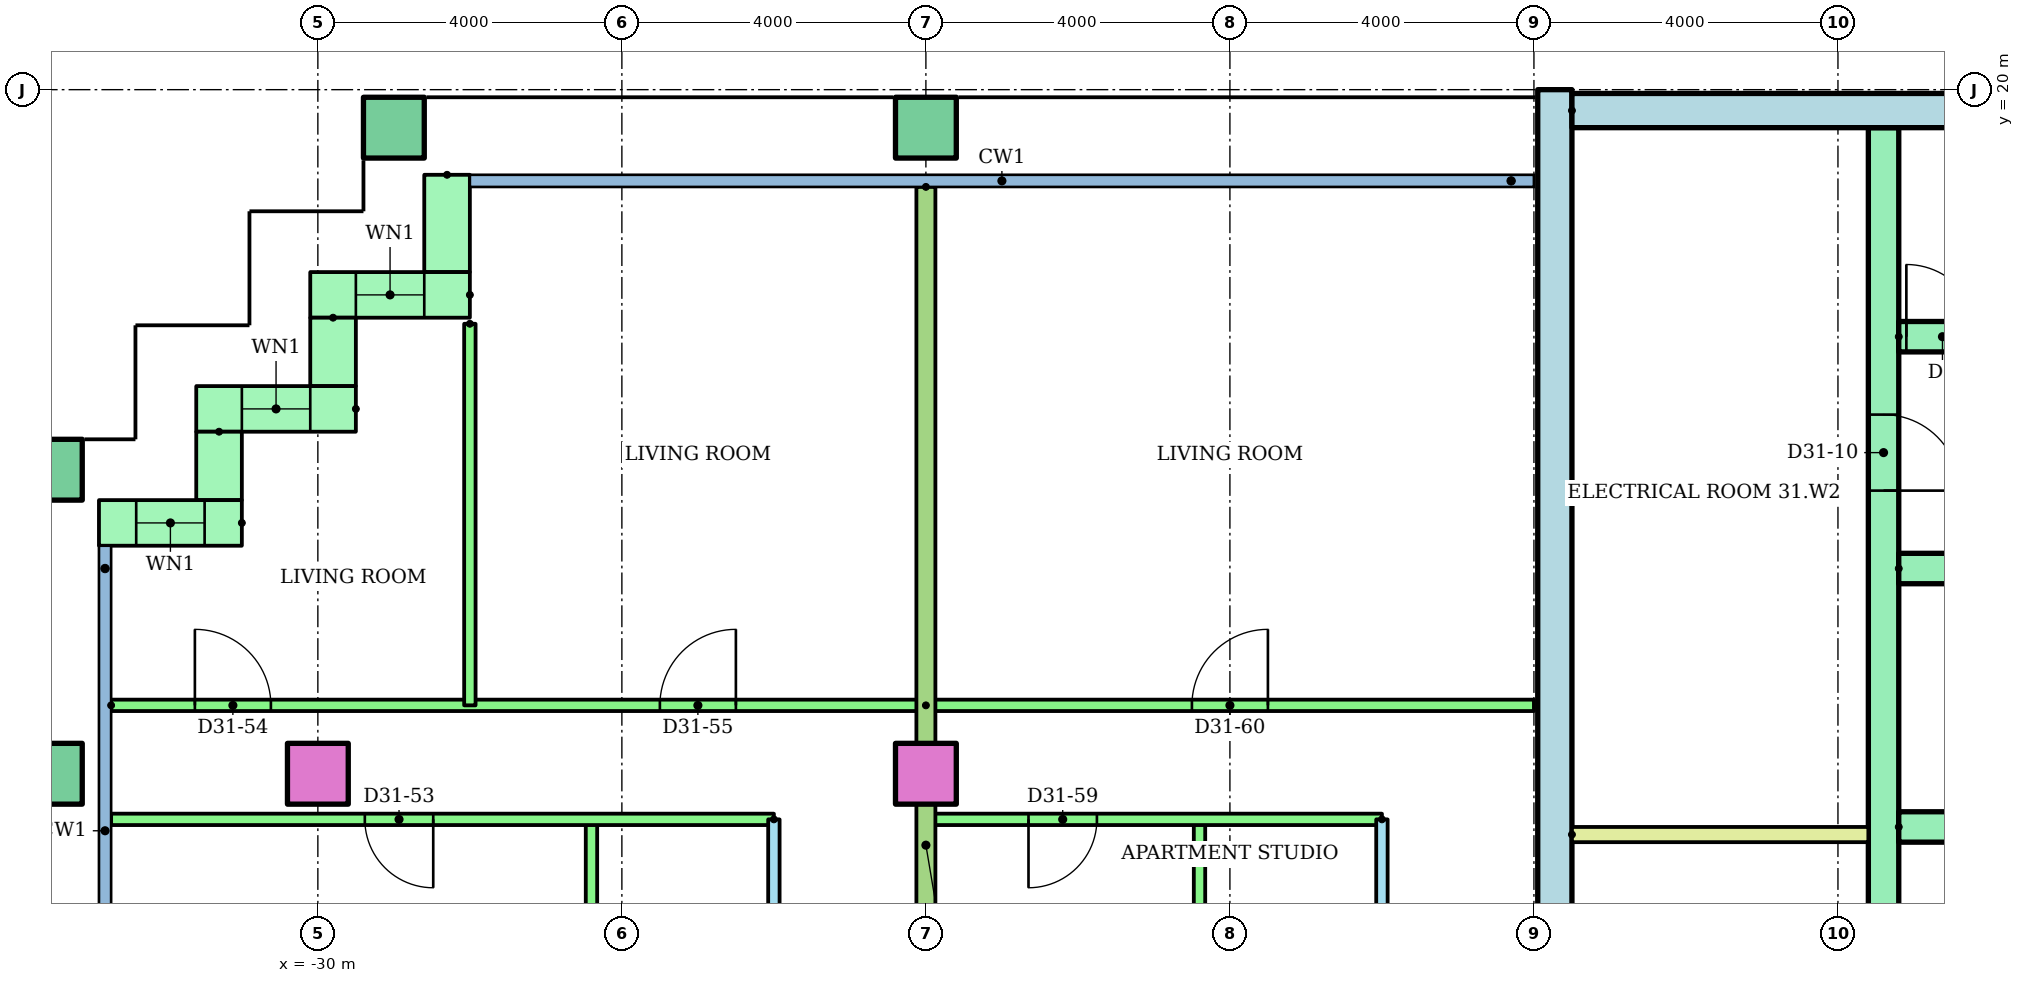
"""IFC4 building model, lengths in metres.
Left out: names, types, materials, properties, quantities, classifications, styles, units other than length and angle.
Written with IfcOpenShell. Run it as: python <this file> out.ifc"""

import sys

from ifc_helpers import new_model, si_unit, direction, frame, frame_2d, origin, origin_2d, place, context, subcontext, project, spatial, rectangle, hollow_rectangle, extrude, element, fill, save


model = new_model("IFC4")
c1 = context("Model", 3, precision=1e-05, world=origin(), true_north=direction((0.0, 1.0)))
c2 = subcontext(c1, "Body", "Model", "MODEL_VIEW")
j1 = project(units=[si_unit("LENGTHUNIT", "METRE"), si_unit("PLANEANGLEUNIT", "RADIAN")], contexts=[c1])
p1 = place(None, origin())
s1 = spatial("IfcSite", under=j1, at=p1, CompositionType="ELEMENT")
p2 = place(p1, origin())
s2 = spatial("IfcBuilding", under=s1, at=p2, CompositionType="ELEMENT")
p3 = place(p2, frame((0.0, 0.0, 123.0)))
s3 = spatial("IfcBuildingStorey", under=s2, at=p3, CompositionType="ELEMENT", Elevation=123.0)
p4 = place(p3, frame((-33.5, 11.0, 0.0)))
e1 = element("IfcColumn", 1, at=p4, inside=s3, PredefinedType="COLUMN", context=c2, shape_type="SweptSolid", body=[
    extrude(hollow_rectangle(XDim=0.8, YDim=0.8, WallThickness=0.04, at=origin_2d()), origin(), (0.0, 0.0, 1.0), 3.2),
])
for number, where in (
    (2, (-30.0, 11.0, 0.0)),
    (3, (-22.0, 11.0, 0.0)),
):
    element("IfcColumn", number, at=place(p3, frame(where)), inside=s3, PredefinedType="COLUMN", context=c2, shape_type="SweptSolid", body=[
        extrude(rectangle(XDim=0.8, YDim=0.8, at=origin_2d()), origin(), (0.0, 0.0, 1.0), 3.2),
    ])
for number, where in (
    (4, (-33.5, 15.0, 0.0)),
    (5, (-29.0, 19.5, 0.0)),
    (6, (-22.0, 19.5, 0.0)),
):
    element("IfcColumn", number, at=place(p3, frame(where)), inside=s3, PredefinedType="COLUMN", context=c2, shape_type="SweptSolid", body=[
        extrude(hollow_rectangle(XDim=0.8, YDim=0.8, WallThickness=0.04, at=origin_2d()), origin(), (0.0, 0.0, 1.0), 3.2),
    ])
p5 = place(p3, frame((-28.3, 18.88, 0.0), z_axis=(0.0, 0.0, 1.0), x_axis=(0.0, -1.0, 0.0)))
e7 = element("IfcWall", 7, at=p5, inside=s3, PredefinedType="STANDARD", context=c2, shape_type="SweptSolid", body=[
    extrude(rectangle(XDim=1.28, YDim=0.6, at=frame_2d((0.64, 0.0))), origin(), (0.0, 0.0, 1.0), 2.92),
])
p6 = place(p3, frame((-28.0, 17.3, 0.0), z_axis=(0.0, 0.0, 1.0), x_axis=(-1.0, 0.0, 0.0)))
e8 = element("IfcWall", 8, at=p6, inside=s3, PredefinedType="STANDARD", context=c2, shape_type="SweptSolid", body=[
    extrude(rectangle(XDim=2.1, YDim=0.6, at=frame_2d((1.05, 0.0))), origin(), (0.0, 0.0, 1.0), 2.92),
])
p7 = place(p6, frame((0.6, 0.0, 0.9)))
e9 = element("IfcOpeningElement", 9, at=p7, cuts=e8, PredefinedType="OPENING", context=c2, shape_type="SweptSolid", body=[
    extrude(rectangle(XDim=0.9, YDim=1.5, at=frame_2d((0.45, 0.75))), frame((0.0, 0.31, 0.0), z_axis=(0.0, -1.0, 0.0), x_axis=(1.0, 0.0, 0.0)), (0.0, 0.0, 1.0), 0.62),
])
p8 = place(p3, frame((-29.8, 17.0, 0.0), z_axis=(0.0, 0.0, 1.0), x_axis=(0.0, -1.0, 0.0)))
e10 = element("IfcWall", 10, at=p8, inside=s3, PredefinedType="STANDARD", context=c2, shape_type="SweptSolid", body=[
    extrude(rectangle(XDim=0.9, YDim=0.6, at=frame_2d((0.45, 0.0))), origin(), (0.0, 0.0, 1.0), 2.92),
])
p9 = place(p3, frame((-29.5, 15.8, 0.0), z_axis=(0.0, 0.0, 1.0), x_axis=(-1.0, 0.0, 0.0)))
e11 = element("IfcWall", 11, at=p9, inside=s3, PredefinedType="STANDARD", context=c2, shape_type="SweptSolid", body=[
    extrude(rectangle(XDim=2.1, YDim=0.6, at=frame_2d((1.05, 0.0))), origin(), (0.0, 0.0, 1.0), 2.92),
])
p10 = place(p9, frame((0.6, 0.0, 0.9)))
e12 = element("IfcOpeningElement", 12, at=p10, cuts=e11, PredefinedType="OPENING", context=c2, shape_type="SweptSolid", body=[
    extrude(rectangle(XDim=0.9, YDim=1.5, at=frame_2d((0.45, 0.75))), frame((0.0, 0.31, 0.0), z_axis=(0.0, -1.0, 0.0), x_axis=(1.0, 0.0, 0.0)), (0.0, 0.0, 1.0), 0.62),
])
p11 = place(p3, frame((-31.3, 15.5, 0.0), z_axis=(0.0, 0.0, 1.0), x_axis=(0.0, -1.0, 0.0)))
e13 = element("IfcWall", 13, at=p11, inside=s3, PredefinedType="STANDARD", context=c2, shape_type="SweptSolid", body=[
    extrude(rectangle(XDim=0.9, YDim=0.6, at=frame_2d((0.45, 0.0))), origin(), (0.0, 0.0, 1.0), 2.92),
])
p12 = place(p3, frame((-31.0, 14.3, 0.0), z_axis=(0.0, 0.0, 1.0), x_axis=(-1.0, 0.0, 0.0)))
e14 = element("IfcWall", 14, at=p12, inside=s3, PredefinedType="STANDARD", context=c2, shape_type="SweptSolid", body=[
    extrude(rectangle(XDim=1.88, YDim=0.6, at=frame_2d((0.94, 0.0))), origin(), (0.0, 0.0, 1.0), 2.92),
])
p13 = place(p12, frame((0.49, 0.0, 0.9)))
e15 = element("IfcOpeningElement", 15, at=p13, cuts=e14, PredefinedType="OPENING", context=c2, shape_type="SweptSolid", body=[
    extrude(rectangle(XDim=0.9, YDim=1.5, at=frame_2d((0.45, 0.75))), frame((0.0, 0.31, 0.0), z_axis=(0.0, -1.0, 0.0), x_axis=(1.0, 0.0, 0.0)), (0.0, 0.0, 1.0), 0.62),
])
p14 = place(p3, frame((-13.725, 3.0, 0.0), z_axis=(0.0, 0.0, 1.0), x_axis=(0.0, 1.0, 0.0)))
e16 = element("IfcWall", 16, at=p14, inside=s3, PredefinedType="SHEAR", context=c2, shape_type="SweptSolid", body=[
    extrude(rectangle(XDim=17.0, YDim=0.45, at=frame_2d((8.5, 0.0))), origin(), (0.0, 0.0, 1.0), 2.92),
])
p15 = place(p3, frame((-13.5, 19.725, 0.0)))
e17 = element("IfcWall", 17, at=p15, inside=s3, PredefinedType="SHEAR", context=c2, shape_type="SweptSolid", body=[
    extrude(rectangle(XDim=27.0, YDim=0.45, at=frame_2d((13.5, 0.0))), origin(), (0.0, 0.0, 1.0), 2.92),
])
p16 = place(p3, frame((-9.4, 6.8, 0.0), z_axis=(0.0, 0.0, 1.0), x_axis=(0.0, 1.0, 0.0)))
e18 = element("IfcWall", 18, at=p16, inside=s3, PredefinedType="SHEAR", context=c2, shape_type="SweptSolid", body=[
    extrude(rectangle(XDim=12.7, YDim=0.4, at=frame_2d((6.35, 0.0))), origin(), (0.0, 0.0, 1.0), 2.92),
])
p17 = place(p16, frame((1.15, 0.0, 0.0)))
e19 = element("IfcOpeningElement", 19, at=p17, cuts=e18, PredefinedType="OPENING", context=c2, shape_type="SweptSolid", body=[
    extrude(rectangle(XDim=1.0, YDim=2.1, at=frame_2d((0.5, 1.05))), frame((0.0, 0.21, 0.0), z_axis=(0.0, -1.0, 0.0), x_axis=(1.0, 0.0, 0.0)), (0.0, 0.0, 1.0), 0.42),
])
p18 = place(p16, frame((7.925, 0.0, 0.0)))
e20 = element("IfcOpeningElement", 20, at=p18, cuts=e18, PredefinedType="OPENING", context=c2, shape_type="SweptSolid", body=[
    extrude(rectangle(XDim=1.0, YDim=2.1, at=frame_2d((0.5, 1.05))), frame((0.0, 0.21, 0.0), z_axis=(0.0, -1.0, 0.0), x_axis=(1.0, 0.0, 0.0)), (0.0, 0.0, 1.0), 0.42),
])
p19 = place(p3, frame((-9.2, 10.3, 0.0)))
e21 = element("IfcWall", 21, at=p19, inside=s3, PredefinedType="SHEAR", context=c2, shape_type="SweptSolid", body=[
    extrude(rectangle(XDim=8.0, YDim=0.4, at=frame_2d((4.0, 0.0))), origin(), (0.0, 0.0, 1.0), 2.92),
])
p20 = place(p19, frame((2.033, 0.0, 0.0)))
e22 = element("IfcOpeningElement", 22, at=p20, cuts=e21, PredefinedType="OPENING", context=c2, shape_type="SweptSolid", body=[
    extrude(rectangle(XDim=1.0, YDim=2.1, at=frame_2d((0.5, 1.05))), frame((0.0, 0.21, 0.0), z_axis=(0.0, -1.0, 0.0), x_axis=(1.0, 0.0, 0.0)), (0.0, 0.0, 1.0), 0.42),
])
p21 = place(p19, frame((6.133, 0.0, 0.0)))
e23 = element("IfcOpeningElement", 23, at=p21, cuts=e21, PredefinedType="OPENING", context=c2, shape_type="SweptSolid", body=[
    extrude(rectangle(XDim=1.0, YDim=2.1, at=frame_2d((0.5, 1.05))), frame((0.0, 0.21, 0.0), z_axis=(0.0, -1.0, 0.0), x_axis=(1.0, 0.0, 0.0)), (0.0, 0.0, 1.0), 0.42),
])
p22 = place(p3, frame((-9.2, 13.7, 0.0)))
e24 = element("IfcWall", 24, at=p22, inside=s3, PredefinedType="SHEAR", context=c2, shape_type="SweptSolid", body=[
    extrude(rectangle(XDim=8.0, YDim=0.4, at=frame_2d((4.0, 0.0))), origin(), (0.0, 0.0, 1.0), 2.92),
])
p23 = place(p3, frame((-9.2, 16.75, 0.0)))
e25 = element("IfcWall", 25, at=p23, inside=s3, PredefinedType="SHEAR", context=c2, shape_type="SweptSolid", body=[
    extrude(rectangle(XDim=18.4, YDim=0.4, at=frame_2d((9.2, 0.0))), origin(), (0.0, 0.0, 1.0), 2.92),
])
p24 = place(p23, frame((0.1, 0.0, 0.0)))
e26 = element("IfcOpeningElement", 26, at=p24, cuts=e25, PredefinedType="OPENING", context=c2, shape_type="SweptSolid", body=[
    extrude(rectangle(XDim=0.95, YDim=2.1, at=frame_2d((0.475, 1.05))), frame((0.0, 0.21, 0.0), z_axis=(0.0, -1.0, 0.0), x_axis=(1.0, 0.0, 0.0)), (0.0, 0.0, 1.0), 0.42),
])
p25 = place(p23, frame((6.1, 0.0, 0.0)))
e27 = element("IfcOpeningElement", 27, at=p25, cuts=e25, PredefinedType="OPENING", context=c2, shape_type="SweptSolid", body=[
    extrude(rectangle(XDim=0.95, YDim=2.1, at=frame_2d((0.475, 1.05))), frame((0.0, 0.21, 0.0), z_axis=(0.0, -1.0, 0.0), x_axis=(1.0, 0.0, 0.0)), (0.0, 0.0, 1.0), 0.42),
])
p26 = place(p23, frame((12.1, 0.0, 0.0)))
e28 = element("IfcOpeningElement", 28, at=p26, cuts=e25, PredefinedType="OPENING", context=c2, shape_type="SweptSolid", body=[
    extrude(rectangle(XDim=0.95, YDim=2.1, at=frame_2d((0.475, 1.05))), frame((0.0, 0.21, 0.0), z_axis=(0.0, -1.0, 0.0), x_axis=(1.0, 0.0, 0.0)), (0.0, 0.0, 1.0), 0.42),
])
p27 = place(p3, frame((-13.5, 10.2, 0.0)))
e29 = element("IfcWall", 29, at=p27, inside=s3, PredefinedType="PARTITIONING", context=c2, shape_type="SweptSolid", body=[
    extrude(rectangle(XDim=3.9, YDim=0.2, at=frame_2d((1.95, 0.0))), origin(), (0.0, 0.0, 1.0), 2.92),
])
p28 = place(p3, frame((-24.0, 1.4, 0.0), z_axis=(0.0, 0.0, 1.0), x_axis=(0.0, 1.0, 0.0)))
e30 = element("IfcWall", 30, at=p28, inside=s3, PredefinedType="PARTITIONING", context=c2, shape_type="SweptSolid", body=[
    extrude(rectangle(XDim=9.0, YDim=0.15, at=frame_2d((4.5, 0.0))), origin(), (0.0, 0.0, 1.0), 2.4),
])
p29 = place(p28, frame((2.05, 0.0, 0.0)))
e31 = element("IfcOpeningElement", 31, at=p29, cuts=e30, PredefinedType="OPENING", context=c2, shape_type="SweptSolid", body=[
    extrude(rectangle(XDim=0.9, YDim=2.1, at=frame_2d((0.45, 1.05))), frame((0.0, 0.085, 0.0), z_axis=(0.0, -1.0, 0.0), x_axis=(1.0, 0.0, 0.0)), (0.0, 0.0, 1.0), 0.17),
])
p30 = place(p28, frame((6.6, 0.0, 0.0)))
e32 = element("IfcOpeningElement", 32, at=p30, cuts=e30, PredefinedType="OPENING", context=c2, shape_type="SweptSolid", body=[
    extrude(rectangle(XDim=0.8, YDim=2.1, at=frame_2d((0.4, 1.05))), frame((0.0, 0.085, 0.0), z_axis=(0.0, -1.0, 0.0), x_axis=(1.0, 0.0, 0.0)), (0.0, 0.0, 1.0), 0.17),
])
p31 = place(p3, frame((-26.4, 1.4, 0.0), z_axis=(0.0, 0.0, 1.0), x_axis=(0.0, 1.0, 0.0)))
e33 = element("IfcWall", 33, at=p31, inside=s3, PredefinedType="PARTITIONING", context=c2, shape_type="SweptSolid", body=[
    extrude(rectangle(XDim=9.0, YDim=0.15, at=frame_2d((4.5, 0.0))), origin(), (0.0, 0.0, 1.0), 2.4),
])
p32 = place(p3, frame((-24.0, 10.4, 0.0), z_axis=(0.0, 0.0, 1.0), x_axis=(-1.0, 0.0, 0.0)))
e34 = element("IfcWall", 34, at=p32, inside=s3, PredefinedType="PARTITIONING", context=c2, shape_type="SweptSolid", body=[
    extrude(rectangle(XDim=8.72, YDim=0.15, at=frame_2d((4.36, 0.0))), origin(), (0.0, 0.0, 1.0), 2.4),
])
p33 = place(p32, frame((4.482, 0.0, 0.0)))
e35 = element("IfcOpeningElement", 35, at=p33, cuts=e34, PredefinedType="OPENING", context=c2, shape_type="SweptSolid", body=[
    extrude(rectangle(XDim=0.9, YDim=2.1, at=frame_2d((0.45, 1.05))), frame((0.0, 0.085, 0.0), z_axis=(0.0, -1.0, 0.0), x_axis=(1.0, 0.0, 0.0)), (0.0, 0.0, 1.0), 0.17),
])
p34 = place(p3, frame((-32.72, 11.9, 0.0)))
e36 = element("IfcWall", 36, at=p34, inside=s3, PredefinedType="PARTITIONING", context=c2, shape_type="SweptSolid", body=[
    extrude(rectangle(XDim=10.72, YDim=0.15, at=frame_2d((5.36, 0.0))), origin(), (0.0, 0.0, 1.0), 2.4),
])
p35 = place(p34, frame((1.102, 0.0, 0.0)))
e37 = element("IfcOpeningElement", 37, at=p35, cuts=e36, PredefinedType="OPENING", context=c2, shape_type="SweptSolid", body=[
    extrude(rectangle(XDim=1.0, YDim=2.1, at=frame_2d((0.5, 1.05))), frame((0.0, 0.085, 0.0), z_axis=(0.0, -1.0, 0.0), x_axis=(1.0, 0.0, 0.0)), (0.0, 0.0, 1.0), 0.17),
])
p36 = place(p34, frame((7.22, 0.0, 0.0)))
e38 = element("IfcOpeningElement", 38, at=p36, cuts=e36, PredefinedType="OPENING", context=c2, shape_type="SweptSolid", body=[
    extrude(rectangle(XDim=1.0, YDim=2.1, at=frame_2d((0.5, 1.05))), frame((0.0, 0.085, 0.0), z_axis=(0.0, -1.0, 0.0), x_axis=(1.0, 0.0, 0.0)), (0.0, 0.0, 1.0), 0.17),
])
p37 = place(p3, frame((-28.0, 16.92, 0.0), z_axis=(0.0, 0.0, 1.0), x_axis=(0.0, -1.0, 0.0)))
e39 = element("IfcWall", 39, at=p37, inside=s3, PredefinedType="PARTITIONING", context=c2, shape_type="SweptSolid", body=[
    extrude(rectangle(XDim=5.02, YDim=0.15, at=frame_2d((2.51, 0.0))), origin(), (0.0, 0.0, 1.0), 2.4),
])
p38 = place(p3, frame((-16.0, 1.4, 0.0), z_axis=(0.0, 0.0, 1.0), x_axis=(0.0, 1.0, 0.0)))
e40 = element("IfcWall", 40, at=p38, inside=s3, PredefinedType="PARTITIONING", context=c2, shape_type="SweptSolid", body=[
    extrude(rectangle(XDim=9.0, YDim=0.15, at=frame_2d((4.5, 0.0))), origin(), (0.0, 0.0, 1.0), 2.4),
])
p39 = place(p38, frame((2.05, 0.0, 0.0)))
e41 = element("IfcOpeningElement", 41, at=p39, cuts=e40, PredefinedType="OPENING", context=c2, shape_type="SweptSolid", body=[
    extrude(rectangle(XDim=0.9, YDim=2.1, at=frame_2d((0.45, 1.05))), frame((0.0, 0.085, 0.0), z_axis=(0.0, -1.0, 0.0), x_axis=(1.0, 0.0, 0.0)), (0.0, 0.0, 1.0), 0.17),
])
p40 = place(p38, frame((6.6, 0.0, 0.0)))
e42 = element("IfcOpeningElement", 42, at=p40, cuts=e40, PredefinedType="OPENING", context=c2, shape_type="SweptSolid", body=[
    extrude(rectangle(XDim=0.8, YDim=2.1, at=frame_2d((0.4, 1.05))), frame((0.0, 0.085, 0.0), z_axis=(0.0, -1.0, 0.0), x_axis=(1.0, 0.0, 0.0)), (0.0, 0.0, 1.0), 0.17),
])
p41 = place(p3, frame((-18.4, 1.4, 0.0), z_axis=(0.0, 0.0, 1.0), x_axis=(0.0, 1.0, 0.0)))
e43 = element("IfcWall", 43, at=p41, inside=s3, PredefinedType="PARTITIONING", context=c2, shape_type="SweptSolid", body=[
    extrude(rectangle(XDim=9.0, YDim=0.15, at=frame_2d((4.5, 0.0))), origin(), (0.0, 0.0, 1.0), 2.4),
])
p42 = place(p3, frame((-16.0, 10.4, 0.0), z_axis=(0.0, 0.0, 1.0), x_axis=(-1.0, 0.0, 0.0)))
e44 = element("IfcWall", 44, at=p42, inside=s3, PredefinedType="PARTITIONING", context=c2, shape_type="SweptSolid", body=[
    extrude(rectangle(XDim=6.0, YDim=0.15, at=frame_2d((3.0, 0.0))), origin(), (0.0, 0.0, 1.0), 2.4),
])
p43 = place(p42, frame((3.75, 0.0, 0.0)))
e45 = element("IfcOpeningElement", 45, at=p43, cuts=e44, PredefinedType="OPENING", context=c2, shape_type="SweptSolid", body=[
    extrude(rectangle(XDim=0.9, YDim=2.1, at=frame_2d((0.45, 1.05))), frame((0.0, 0.085, 0.0), z_axis=(0.0, -1.0, 0.0), x_axis=(1.0, 0.0, 0.0)), (0.0, 0.0, 1.0), 0.17),
])
p44 = place(p3, frame((-22.0, 11.9, 0.0)))
e46 = element("IfcWall", 46, at=p44, inside=s3, PredefinedType="PARTITIONING", context=c2, shape_type="SweptSolid", body=[
    extrude(rectangle(XDim=8.0, YDim=0.15, at=frame_2d((4.0, 0.0))), origin(), (0.0, 0.0, 1.0), 2.4),
])
p45 = place(p44, frame((3.5, 0.0, 0.0)))
e47 = element("IfcOpeningElement", 47, at=p45, cuts=e46, PredefinedType="OPENING", context=c2, shape_type="SweptSolid", body=[
    extrude(rectangle(XDim=1.0, YDim=2.1, at=frame_2d((0.5, 1.05))), frame((0.0, 0.085, 0.0), z_axis=(0.0, -1.0, 0.0), x_axis=(1.0, 0.0, 0.0)), (0.0, 0.0, 1.0), 0.17),
])
p46 = place(p3, frame((-22.0, 18.721, 0.0), z_axis=(0.0, 0.0, 1.0), x_axis=(0.0, -1.0, 0.0)))
e48 = element("IfcWall", 48, at=p46, inside=s3, PredefinedType="PARTITIONING", context=c2, shape_type="SweptSolid", body=[
    extrude(rectangle(XDim=17.321, YDim=0.25, at=frame_2d((8.661, 0.0))), origin(), (0.0, 0.0, 1.0), 2.4),
])
p47 = place(p7, origin())
e49 = element("IfcWindow", 49, at=p47, inside=s3, PartitioningType="SINGLE_PANEL", PredefinedType="WINDOW", context=c2, shape_type="SweptSolid", body=[
    extrude(rectangle(XDim=0.9, YDim=1.5, at=frame_2d((0.45, 0.75))), frame((0.0, 0.03, 0.0), z_axis=(0.0, -1.0, 0.0), x_axis=(1.0, 0.0, 0.0)), (0.0, 0.0, 1.0), 0.06),
])
fill(e9, e49)
p48 = place(p10, origin())
e50 = element("IfcWindow", 50, at=p48, inside=s3, PartitioningType="SINGLE_PANEL", PredefinedType="WINDOW", context=c2, shape_type="SweptSolid", body=[
    extrude(rectangle(XDim=0.9, YDim=1.5, at=frame_2d((0.45, 0.75))), frame((0.0, 0.03, 0.0), z_axis=(0.0, -1.0, 0.0), x_axis=(1.0, 0.0, 0.0)), (0.0, 0.0, 1.0), 0.06),
])
fill(e12, e50)
p49 = place(p13, origin())
e51 = element("IfcWindow", 51, at=p49, inside=s3, PartitioningType="SINGLE_PANEL", PredefinedType="WINDOW", context=c2, shape_type="SweptSolid", body=[
    extrude(rectangle(XDim=0.9, YDim=1.5, at=frame_2d((0.45, 0.75))), frame((0.0, 0.03, 0.0), z_axis=(0.0, -1.0, 0.0), x_axis=(1.0, 0.0, 0.0)), (0.0, 0.0, 1.0), 0.06),
])
fill(e15, e51)
p50 = place(p24, origin())
e52 = element("IfcDoor", 52, at=p50, inside=s3, OperationType="SINGLE_SWING_LEFT", PredefinedType="DOOR", context=c2, shape_type="SweptSolid", body=[
    extrude(rectangle(XDim=0.95, YDim=2.1, at=frame_2d((0.475, 1.05))), frame((0.0, 0.025, 0.0), z_axis=(0.0, -1.0, 0.0), x_axis=(1.0, 0.0, 0.0)), (0.0, 0.0, 1.0), 0.05),
])
fill(e26, e52)
p51 = place(p18, frame((1.0, 0.0, 0.0), z_axis=(0.0, 0.0, 1.0), x_axis=(-1.0, 0.0, 0.0)))
e53 = element("IfcDoor", 53, at=p51, inside=s3, OperationType="SINGLE_SWING_LEFT", PredefinedType="DOOR", context=c2, shape_type="SweptSolid", body=[
    extrude(rectangle(XDim=1.0, YDim=2.1, at=frame_2d((0.5, 1.05))), frame((0.0, 0.025, 0.0), z_axis=(0.0, -1.0, 0.0), x_axis=(1.0, 0.0, 0.0)), (0.0, 0.0, 1.0), 0.05),
])
fill(e20, e53)
p52 = place(p33, origin())
e54 = element("IfcDoor", 54, at=p52, inside=s3, OperationType="SINGLE_SWING_LEFT", PredefinedType="DOOR", context=c2, shape_type="SweptSolid", body=[
    extrude(rectangle(XDim=0.9, YDim=2.1, at=frame_2d((0.45, 1.05))), frame((0.0, 0.025, 0.0), z_axis=(0.0, -1.0, 0.0), x_axis=(1.0, 0.0, 0.0)), (0.0, 0.0, 1.0), 0.05),
])
fill(e35, e54)
p53 = place(p35, origin())
e55 = element("IfcDoor", 55, at=p53, inside=s3, OperationType="SINGLE_SWING_LEFT", PredefinedType="DOOR", context=c2, shape_type="SweptSolid", body=[
    extrude(rectangle(XDim=1.0, YDim=2.1, at=frame_2d((0.5, 1.05))), frame((0.0, 0.025, 0.0), z_axis=(0.0, -1.0, 0.0), x_axis=(1.0, 0.0, 0.0)), (0.0, 0.0, 1.0), 0.05),
])
fill(e37, e55)
p54 = place(p36, origin())
e56 = element("IfcDoor", 56, at=p54, inside=s3, OperationType="SINGLE_SWING_RIGHT", PredefinedType="DOOR", context=c2, shape_type="SweptSolid", body=[
    extrude(rectangle(XDim=1.0, YDim=2.1, at=frame_2d((0.5, 1.05))), frame((0.0, 0.025, 0.0), z_axis=(0.0, -1.0, 0.0), x_axis=(1.0, 0.0, 0.0)), (0.0, 0.0, 1.0), 0.05),
])
fill(e38, e56)
p55 = place(p43, origin())
e57 = element("IfcDoor", 57, at=p55, inside=s3, OperationType="SINGLE_SWING_RIGHT", PredefinedType="DOOR", context=c2, shape_type="SweptSolid", body=[
    extrude(rectangle(XDim=0.9, YDim=2.1, at=frame_2d((0.45, 1.05))), frame((0.0, 0.025, 0.0), z_axis=(0.0, -1.0, 0.0), x_axis=(1.0, 0.0, 0.0)), (0.0, 0.0, 1.0), 0.05),
])
fill(e45, e57)
p56 = place(p45, origin())
e58 = element("IfcDoor", 58, at=p56, inside=s3, OperationType="SINGLE_SWING_RIGHT", PredefinedType="DOOR", context=c2, shape_type="SweptSolid", body=[
    extrude(rectangle(XDim=1.0, YDim=2.1, at=frame_2d((0.5, 1.05))), frame((0.0, 0.025, 0.0), z_axis=(0.0, -1.0, 0.0), x_axis=(1.0, 0.0, 0.0)), (0.0, 0.0, 1.0), 0.05),
])
fill(e47, e58)
save(model, sys.argv[1])
